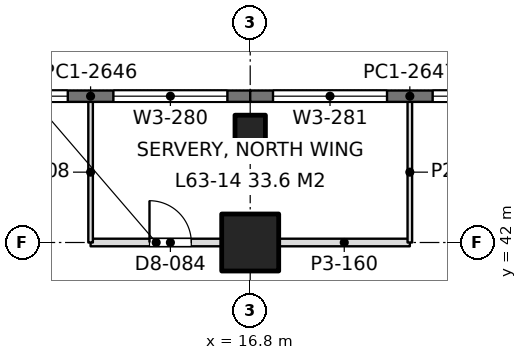
"""IFC4 building model, lengths in metres.
Left out: names, types, materials, properties, quantities, classifications, styles, units other than length and angle.
Written with IfcOpenShell. Run it as: python <this file> out.ifc"""

import sys

from ifc_helpers import new_model, si_unit, direction, frame, frame_2d, origin, origin_2d, place, context, subcontext, project, spatial, rectangle, extrude, element, fill, save


model = new_model("IFC4")
c1 = context("Model", 3, precision=1e-05, world=origin(), true_north=direction((0.0, 1.0)))
c2 = subcontext(c1, "Body", "Model", "MODEL_VIEW")
j1 = project(units=[si_unit("LENGTHUNIT", "METRE"), si_unit("PLANEANGLEUNIT", "RADIAN")], contexts=[c1])
p1 = place(None, origin())
s1 = spatial("IfcSite", under=j1, at=p1, CompositionType="ELEMENT")
p2 = place(p1, origin())
s2 = spatial("IfcBuilding", under=s1, at=p2, CompositionType="ELEMENT")
p3 = place(p2, frame((0.0, 0.0, 277.2)))
s3 = spatial("IfcBuildingStorey", under=s2, at=p3, CompositionType="ELEMENT", Elevation=277.2)
p4 = place(p3, frame((16.8, 42.0, 0.0), z_axis=(0.0, 0.0, 1.0), x_axis=(1.0, 0.0, 0.0)))
e1 = element("IfcColumn", 1, at=p4, inside=s3, PredefinedType="COLUMN", context=c2, shape_type="SweptSolid", body=[
    extrude(rectangle(XDim=1.5, YDim=1.5, at=origin_2d()), origin(), (0.0, 0.0, 1.0), 4.5),
])
p5 = place(p3, frame((16.8, 44.8, 0.0), z_axis=(0.0, 0.0, 1.0), x_axis=(1.0, 0.0, 0.0)))
e2 = element("IfcColumn", 2, at=p5, inside=s3, PredefinedType="COLUMN", context=c2, shape_type="SweptSolid", body=[
    extrude(rectangle(XDim=0.8, YDim=1.1, at=origin_2d()), origin(), (0.0, 0.0, 1.0), 4.5),
])
p6 = place(p3, frame((8.4, 45.85, 0.0), z_axis=(0.0, 0.0, 1.0), x_axis=(1.0, 0.0, 0.0)))
e3 = element("IfcWall", 3, at=p6, inside=s3, PredefinedType="SOLIDWALL", context=c2, shape_type="SweptSolid", body=[
    extrude(rectangle(XDim=8.4, YDim=0.3, at=frame_2d((4.2, 0.0))), origin(), (0.0, 0.0, 1.0), 4.3),
])
p7 = place(p6, frame((0.6, 0.0, 0.9)))
e4 = element("IfcOpeningElement", 4, at=p7, cuts=e3, PredefinedType="OPENING", context=c2, shape_type="SweptSolid", body=[
    extrude(rectangle(XDim=3.0, YDim=2.4, at=frame_2d((1.5, 1.2))), frame((0.0, 0.16, 0.0), z_axis=(0.0, -1.0, 0.0), x_axis=(1.0, 0.0, 0.0)), (0.0, 0.0, 1.0), 0.32),
])
p8 = place(p6, frame((4.8, 0.0, 0.9)))
e5 = element("IfcOpeningElement", 5, at=p8, cuts=e3, PredefinedType="OPENING", context=c2, shape_type="SweptSolid", body=[
    extrude(rectangle(XDim=3.0, YDim=2.4, at=frame_2d((1.5, 1.2))), frame((0.0, 0.16, 0.0), z_axis=(0.0, -1.0, 0.0), x_axis=(1.0, 0.0, 0.0)), (0.0, 0.0, 1.0), 0.32),
])
p9 = place(p3, frame((16.8, 45.85, 0.0), z_axis=(0.0, 0.0, 1.0), x_axis=(1.0, 0.0, 0.0)))
e6 = element("IfcWall", 6, at=p9, inside=s3, PredefinedType="SOLIDWALL", context=c2, shape_type="SweptSolid", body=[
    extrude(rectangle(XDim=8.4, YDim=0.3, at=frame_2d((4.2, 0.0))), origin(), (0.0, 0.0, 1.0), 4.3),
])
p10 = place(p9, frame((0.6, 0.0, 0.9)))
e7 = element("IfcOpeningElement", 7, at=p10, cuts=e6, PredefinedType="OPENING", context=c2, shape_type="SweptSolid", body=[
    extrude(rectangle(XDim=3.0, YDim=2.4, at=frame_2d((1.5, 1.2))), frame((0.0, 0.16, 0.0), z_axis=(0.0, -1.0, 0.0), x_axis=(1.0, 0.0, 0.0)), (0.0, 0.0, 1.0), 0.32),
])
p11 = place(p9, frame((4.8, 0.0, 0.9)))
e8 = element("IfcOpeningElement", 8, at=p11, cuts=e6, PredefinedType="OPENING", context=c2, shape_type="SweptSolid", body=[
    extrude(rectangle(XDim=3.0, YDim=2.4, at=frame_2d((1.5, 1.2))), frame((0.0, 0.16, 0.0), z_axis=(0.0, -1.0, 0.0), x_axis=(1.0, 0.0, 0.0)), (0.0, 0.0, 1.0), 0.32),
])
p12 = place(p3, frame((12.6, 42.0, 0.0), z_axis=(0.0, 0.0, 1.0), x_axis=(1.0, 0.0, 0.0)))
e9 = element("IfcWall", 9, at=p12, inside=s3, PredefinedType="PARTITIONING", context=c2, shape_type="SweptSolid", body=[
    extrude(rectangle(XDim=3.451, YDim=0.2, at=frame_2d((1.726, 0.0))), origin(), (0.0, 0.0, 1.0), 3.292),
])
p13 = place(p12, frame((1.55, 0.0, 0.0)))
e10 = element("IfcOpeningElement", 10, at=p13, cuts=e9, PredefinedType="OPENING", context=c2, shape_type="SweptSolid", body=[
    extrude(rectangle(XDim=1.1, YDim=2.4, at=frame_2d((0.55, 1.2))), frame((0.0, 0.11, 0.0), z_axis=(0.0, -1.0, 0.0), x_axis=(1.0, 0.0, 0.0)), (0.0, 0.0, 1.0), 0.22),
])
p14 = place(p3, frame((17.549, 42.0, 0.0), z_axis=(0.0, 0.0, 1.0), x_axis=(1.0, 0.0, 0.0)))
e11 = element("IfcWall", 11, at=p14, inside=s3, PredefinedType="PARTITIONING", context=c2, shape_type="SweptSolid", body=[
    extrude(rectangle(XDim=3.451, YDim=0.2, at=frame_2d((1.726, 0.0))), origin(), (0.0, 0.0, 1.0), 3.182),
])
p15 = place(p3, frame((12.6, 42.0, 0.0), z_axis=(0.0, 0.0, 1.0), x_axis=(0.0, 1.0, 0.0)))
e12 = element("IfcWall", 12, at=p15, inside=s3, PredefinedType="PARTITIONING", context=c2, shape_type="SweptSolid", body=[
    extrude(rectangle(XDim=3.702, YDim=0.12, at=frame_2d((1.851, 0.0))), origin(), (0.0, 0.0, 1.0), 3.292),
])
p16 = place(p3, frame((21.0, 42.0, 0.0), z_axis=(0.0, 0.0, 1.0), x_axis=(0.0, 1.0, 0.0)))
e13 = element("IfcWall", 13, at=p16, inside=s3, PredefinedType="PARTITIONING", context=c2, shape_type="SweptSolid", body=[
    extrude(rectangle(XDim=3.702, YDim=0.12, at=frame_2d((1.851, 0.0))), origin(), (0.0, 0.0, 1.0), 3.182),
])
p17 = place(p7, origin())
e14 = element("IfcWindow", 14, at=p17, inside=s3, PartitioningType="SINGLE_PANEL", PredefinedType="WINDOW", context=c2, shape_type="SweptSolid", body=[
    extrude(rectangle(XDim=3.0, YDim=2.4, at=frame_2d((1.5, 1.2))), frame((0.0, 0.03, 0.0), z_axis=(0.0, -1.0, 0.0), x_axis=(1.0, 0.0, 0.0)), (0.0, 0.0, 1.0), 0.06),
])
fill(e4, e14)
p18 = place(p8, origin())
e15 = element("IfcWindow", 15, at=p18, inside=s3, PartitioningType="SINGLE_PANEL", PredefinedType="WINDOW", context=c2, shape_type="SweptSolid", body=[
    extrude(rectangle(XDim=3.0, YDim=2.4, at=frame_2d((1.5, 1.2))), frame((0.0, 0.03, 0.0), z_axis=(0.0, -1.0, 0.0), x_axis=(1.0, 0.0, 0.0)), (0.0, 0.0, 1.0), 0.06),
])
fill(e5, e15)
p19 = place(p10, origin())
e16 = element("IfcWindow", 16, at=p19, inside=s3, PartitioningType="SINGLE_PANEL", PredefinedType="WINDOW", context=c2, shape_type="SweptSolid", body=[
    extrude(rectangle(XDim=3.0, YDim=2.4, at=frame_2d((1.5, 1.2))), frame((0.0, 0.03, 0.0), z_axis=(0.0, -1.0, 0.0), x_axis=(1.0, 0.0, 0.0)), (0.0, 0.0, 1.0), 0.06),
])
fill(e7, e16)
p20 = place(p11, origin())
e17 = element("IfcWindow", 17, at=p20, inside=s3, PartitioningType="SINGLE_PANEL", PredefinedType="WINDOW", context=c2, shape_type="SweptSolid", body=[
    extrude(rectangle(XDim=3.0, YDim=2.4, at=frame_2d((1.5, 1.2))), frame((0.0, 0.03, 0.0), z_axis=(0.0, -1.0, 0.0), x_axis=(1.0, 0.0, 0.0)), (0.0, 0.0, 1.0), 0.06),
])
fill(e8, e17)
p21 = place(p13, origin())
e18 = element("IfcDoor", 18, at=p21, inside=s3, OperationType="SINGLE_SWING_LEFT", PredefinedType="DOOR", context=c2, shape_type="SweptSolid", body=[
    extrude(rectangle(XDim=1.1, YDim=2.4, at=frame_2d((0.55, 1.2))), frame((0.0, 0.025, 0.0), z_axis=(0.0, -1.0, 0.0), x_axis=(1.0, 0.0, 0.0)), (0.0, 0.0, 1.0), 0.05),
])
fill(e10, e18)
save(model, sys.argv[1])
